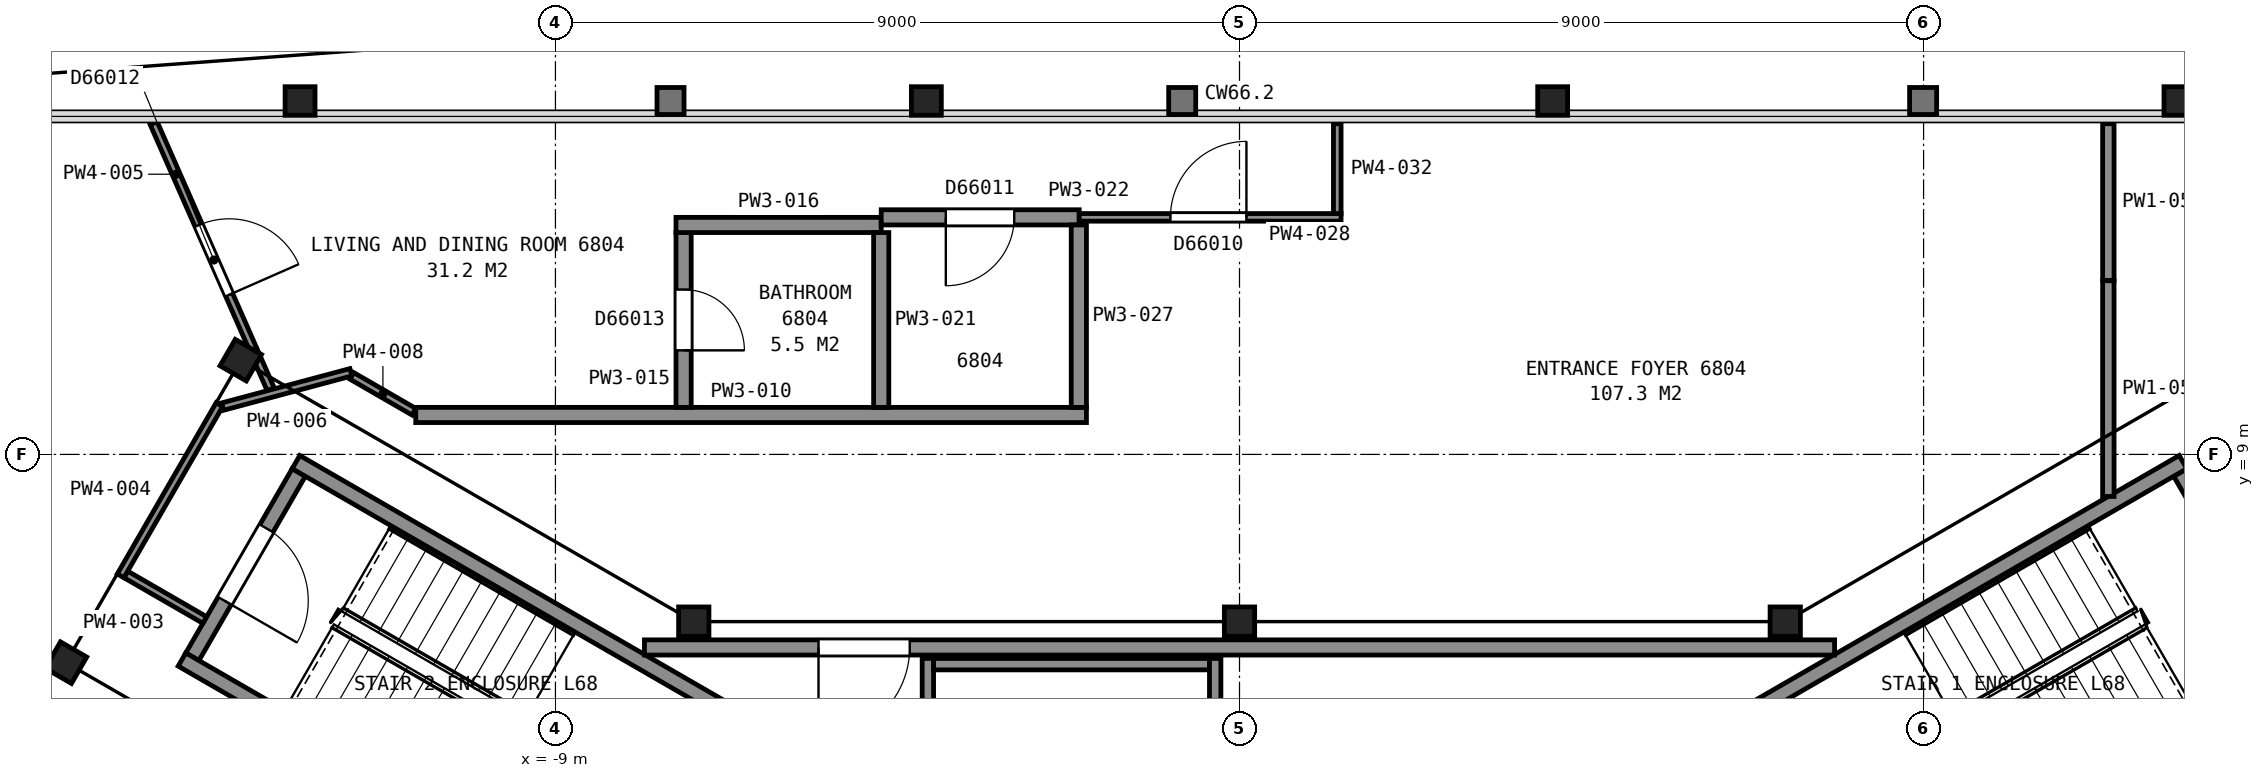
"""IFC4 building model, lengths in metres.
Left out: names, types, materials, properties, quantities, classifications, styles, units other than length and angle.
Written with IfcOpenShell. Run it as: python <this file> out.ifc"""

import sys

from ifc_helpers import new_model, si_unit, direction, frame, frame_2d, origin, origin_2d, place, context, subcontext, project, spatial, rectangle, i_section, extrude, element, fill, save


model = new_model("IFC4")
c1 = context("Model", 3, precision=1e-05, world=origin(), true_north=direction((0.0, 1.0)))
c2 = subcontext(c1, "Body", "Model", "MODEL_VIEW")
j1 = project(units=[si_unit("LENGTHUNIT", "METRE"), si_unit("PLANEANGLEUNIT", "RADIAN")], contexts=[c1])
p1 = place(None, origin())
s1 = spatial("IfcSite", under=j1, at=p1, CompositionType="ELEMENT")
p2 = place(p1, origin())
s2 = spatial("IfcBuilding", under=s1, at=p2, CompositionType="ELEMENT")
p3 = place(p2, frame((0.0, 0.0, 271.4)))
s3 = spatial("IfcBuildingStorey", under=s2, at=p3, CompositionType="ELEMENT", Elevation=271.4)
for number, where, z_axis, x_axis in (
    (1, (12.36, 13.65, 0.0), (0.0, 0.0, 1.0), (1.0, 0.0, 0.0)),
    (2, (4.12, 13.65, 0.0), (0.0, 0.0, 1.0), (1.0, 0.0, 0.0)),
    (3, (-4.12, 13.65, 0.0), (0.0, 0.0, 1.0), (1.0, 0.0, 0.0)),
    (4, (-12.36, 13.65, 0.0), (0.0, 0.0, 1.0), (1.0, 0.0, 0.0)),
):
    element("IfcColumn", number, at=place(p3, frame(where, z_axis=z_axis, x_axis=x_axis)), inside=s3, PredefinedType="COLUMN", context=c2, shape_type="SweptSolid", body=[
        extrude(i_section(OverallWidth=0.394, OverallDepth=0.376, WebThickness=0.017, FlangeThickness=0.028, FilletRadius=0.015, at=origin_2d()), origin(), (0.0, 0.0, 1.0), 3.7),
    ])
for number, where, z_axis, x_axis in (
    (5, (7.18, 6.8, 0.0), (0.0, 0.0, 1.0), (1.0, 0.0, 0.0)),
    (6, (0.0, 6.8, 0.0), (0.0, 0.0, 1.0), (1.0, 0.0, 0.0)),
    (7, (-7.18, 6.8, 0.0), (0.0, 0.0, 1.0), (1.0, 0.0, 0.0)),
):
    element("IfcColumn", number, at=place(p3, frame(where, z_axis=z_axis, x_axis=x_axis)), inside=s3, PredefinedType="COLUMN", context=c2, shape_type="SweptSolid", body=[
        extrude(i_section(OverallWidth=0.399, OverallDepth=0.386, WebThickness=0.021, FlangeThickness=0.033, FilletRadius=0.015, at=origin_2d()), origin(), (0.0, 0.0, 1.0), 3.7),
    ])
for number, where, z_axis, x_axis in (
    (8, (-13.14, 10.24, 0.0), (0.0, 0.0, 1.0), (0.5, 0.866, 0.0)),
    (9, (-15.44, 6.26, 0.0), (0.0, 0.0, 1.0), (0.5, 0.866, 0.0)),
):
    element("IfcColumn", number, at=place(p3, frame(where, z_axis=z_axis, x_axis=x_axis)), inside=s3, PredefinedType="COLUMN", context=c2, shape_type="SweptSolid", body=[
        extrude(i_section(OverallWidth=0.401, OverallDepth=0.399, WebThickness=0.025, FlangeThickness=0.04, FilletRadius=0.015, at=origin_2d()), origin(), (0.0, 0.0, 1.0), 3.7),
    ])
p4 = place(p3, frame((13.777, 6.338, 0.0), z_axis=(0.0, 0.0, 1.0), x_axis=(-0.500049511043, 0.865996816683, 0.0)))
e10 = element("IfcWall", 10, at=p4, inside=s3, PredefinedType="PARTITIONING", context=c2, shape_type="SweptSolid", body=[
    extrude(rectangle(XDim=2.8, YDim=0.2, at=frame_2d((1.4, 0.0))), origin(), (0.0, 0.0, 1.0), 3.45),
])
p5 = place(p4, frame((0.85, 0.0, 0.0)))
e11 = element("IfcOpeningElement", 11, at=p5, cuts=e10, PredefinedType="OPENING", context=c2, shape_type="SweptSolid", body=[
    extrude(rectangle(XDim=1.1, YDim=2.1, at=frame_2d((0.55, 1.05))), frame((0.0, 0.11, 0.0), z_axis=(0.0, -1.0, 0.0), x_axis=(1.0, 0.0, 0.0)), (0.0, 0.0, 1.0), 0.22),
])
for number, where, z_axis, x_axis in (
    (12, (6.178, 5.299, 0.0), (0.0, 0.0, 1.0), (0.866, 0.5, 0.0)),
    (13, (7.678, 2.701, 0.0), (0.0, 0.0, 1.0), (0.866, 0.5, 0.0)),
):
    element("IfcWall", number, at=place(p3, frame(where, z_axis=z_axis, x_axis=x_axis)), inside=s3, PredefinedType="PARTITIONING", context=c2, shape_type="SweptSolid", body=[
        extrude(rectangle(XDim=7.2, YDim=0.2, at=frame_2d((3.6, 0.0))), origin(), (0.0, 0.0, 1.0), 3.45),
    ])
p6 = place(p3, frame((-12.377, 8.762, 0.0), z_axis=(0.0, 0.0, 1.0), x_axis=(-0.500049511043, -0.865996816683, 0.0)))
e14 = element("IfcWall", 14, at=p6, inside=s3, PredefinedType="PARTITIONING", context=c2, shape_type="SweptSolid", body=[
    extrude(rectangle(XDim=2.8, YDim=0.2, at=frame_2d((1.4, 0.0))), origin(), (0.0, 0.0, 1.0), 3.45),
])
p7 = place(p6, frame((0.85, 0.0, 0.0)))
e15 = element("IfcOpeningElement", 15, at=p7, cuts=e14, PredefinedType="OPENING", context=c2, shape_type="SweptSolid", body=[
    extrude(rectangle(XDim=1.1, YDim=2.1, at=frame_2d((0.55, 1.05))), frame((0.0, 0.11, 0.0), z_axis=(0.0, -1.0, 0.0), x_axis=(1.0, 0.0, 0.0)), (0.0, 0.0, 1.0), 0.22),
])
for number, where, z_axis, x_axis in (
    (16, (-7.678, 2.701, 0.0), (0.0, 0.0, 1.0), (-0.866, 0.5, 0.0)),
    (17, (-6.178, 5.299, 0.0), (0.0, 0.0, 1.0), (-0.866, 0.5, 0.0)),
):
    element("IfcWall", number, at=place(p3, frame(where, z_axis=z_axis, x_axis=x_axis)), inside=s3, PredefinedType="PARTITIONING", context=c2, shape_type="SweptSolid", body=[
        extrude(rectangle(XDim=7.2, YDim=0.2, at=frame_2d((3.6, 0.0))), origin(), (0.0, 0.0, 1.0), 3.45),
    ])
p8 = place(p3, frame((7.829, 6.46, 0.0), z_axis=(0.0, 0.0, 1.0), x_axis=(-1.0, 0.0, 0.0)))
e18 = element("IfcWall", 18, at=p8, inside=s3, PredefinedType="PARTITIONING", context=c2, shape_type="SweptSolid", body=[
    extrude(rectangle(XDim=15.658, YDim=0.2, at=frame_2d((7.829, 0.0))), origin(), (0.0, 0.0, 1.0), 3.45),
])
p9 = place(p8, frame((12.168, 0.0, 0.0)))
e19 = element("IfcOpeningElement", 19, at=p9, cuts=e18, PredefinedType="OPENING", context=c2, shape_type="SweptSolid", body=[
    extrude(rectangle(XDim=1.2, YDim=2.1, at=frame_2d((0.6, 1.05))), frame((0.0, 0.11, 0.0), z_axis=(0.0, -1.0, 0.0), x_axis=(1.0, 0.0, 0.0)), (0.0, 0.0, 1.0), 0.22),
])
p10 = place(p3, frame((-4.1, 2.085, 0.0), z_axis=(0.0, 0.0, 1.0), x_axis=(0.0, 1.0, 0.0)))
e20 = element("IfcWall", 20, at=p10, inside=s3, PredefinedType="PARTITIONING", context=c2, shape_type="SweptSolid", body=[
    extrude(rectangle(XDim=4.23, YDim=0.15, at=frame_2d((2.115, 0.0))), origin(), (0.0, 0.0, 1.0), 3.45),
])
p11 = place(p10, frame((1.625, 0.0, 0.0)))
e21 = element("IfcOpeningElement", 21, at=p11, cuts=e20, PredefinedType="OPENING", context=c2, shape_type="SweptSolid", body=[
    extrude(rectangle(XDim=1.0, YDim=2.1, at=frame_2d((0.5, 1.05))), frame((0.0, 0.085, 0.0), z_axis=(0.0, -1.0, 0.0), x_axis=(1.0, 0.0, 0.0)), (0.0, 0.0, 1.0), 0.17),
])
p12 = place(p3, frame((-4.025, 6.24, 0.0), z_axis=(0.0, 0.0, 1.0), x_axis=(1.0, 0.0, 0.0)))
e22 = element("IfcWall", 22, at=p12, inside=s3, PredefinedType="PARTITIONING", context=c2, shape_type="SweptSolid", body=[
    extrude(rectangle(XDim=3.63, YDim=0.15, at=frame_2d((1.815, 0.0))), origin(), (0.0, 0.0, 1.0), 3.45),
])
p13 = place(p3, frame((-0.32, 2.252, 0.0), z_axis=(0.0, 0.0, 1.0), x_axis=(0.0, 1.0, 0.0)))
e23 = element("IfcWall", 23, at=p13, inside=s3, PredefinedType="PARTITIONING", context=c2, shape_type="SweptSolid", body=[
    extrude(rectangle(XDim=4.063, YDim=0.15, at=frame_2d((2.031, 0.0))), origin(), (0.0, 0.0, 1.0), 3.45),
])
p14 = place(p3, frame((-14.653, 7.421, 0.0), z_axis=(0.0, 0.0, 1.0), x_axis=(0.865941482684, -0.500145327446, 0.0)))
e24 = element("IfcWall", 24, at=p14, inside=s3, PredefinedType="PARTITIONING", context=c2, shape_type="SweptSolid", body=[
    extrude(rectangle(XDim=1.199, YDim=0.1, at=frame_2d((0.6, 0.0))), origin(), (0.0, 0.0, 1.0), 2.723),
])
p15 = place(p3, frame((-14.721, 7.403, 0.0), z_axis=(0.0, 0.0, 1.0), x_axis=(0.500006934395, 0.866021400173, 0.0)))
e25 = element("IfcWall", 25, at=p15, inside=s3, PredefinedType="PARTITIONING", context=c2, shape_type="SweptSolid", body=[
    extrude(rectangle(XDim=2.6, YDim=0.1, at=frame_2d((1.3, 0.0))), origin(), (0.0, 0.0, 1.0), 2.723),
])
p16 = place(p3, frame((-12.747, 9.857, 0.0), z_axis=(0.0, 0.0, 1.0), x_axis=(-0.402509649346, 0.91541574281, 0.0)))
e26 = element("IfcWall", 26, at=p16, inside=s3, PredefinedType="PARTITIONING", context=c2, shape_type="SweptSolid", body=[
    extrude(rectangle(XDim=3.824, YDim=0.1, at=frame_2d((1.912, 0.0))), origin(), (0.0, 0.0, 1.0), 2.723),
])
p17 = place(p16, frame((1.357, 0.0, 0.0)))
e27 = element("IfcOpeningElement", 27, at=p17, cuts=e26, PredefinedType="OPENING", context=c2, shape_type="SweptSolid", body=[
    extrude(rectangle(XDim=1.0, YDim=2.1, at=frame_2d((0.5, 1.05))), frame((0.0, 0.06, 0.0), z_axis=(0.0, -1.0, 0.0), x_axis=(1.0, 0.0, 0.0)), (0.0, 0.0, 1.0), 0.12),
])
p18 = place(p3, frame((-13.378, 9.629, 0.0), z_axis=(0.0, 0.0, 1.0), x_axis=(0.966007272337, 0.258514892785, 0.0)))
e28 = element("IfcWall", 28, at=p18, inside=s3, PredefinedType="PARTITIONING", context=c2, shape_type="SweptSolid", body=[
    extrude(rectangle(XDim=1.747, YDim=0.1, at=frame_2d((0.874, 0.0))), origin(), (0.0, 0.0, 1.0), 2.723),
])
p19 = place(p3, frame((-11.678, 10.033, 0.0), z_axis=(0.0, 0.0, 1.0), x_axis=(0.866116627388, -0.499841962787, 0.0)))
e29 = element("IfcWall", 29, at=p19, inside=s3, PredefinedType="PARTITIONING", context=c2, shape_type="SweptSolid", body=[
    extrude(rectangle(XDim=0.943, YDim=0.1, at=frame_2d((0.472, 0.0))), origin(), (0.0, 0.0, 1.0), 2.723),
])
p20 = place(p3, frame((-10.838, 9.519, 0.0), z_axis=(0.0, 0.0, 1.0), x_axis=(1.0, 0.0, 0.0)))
e30 = element("IfcWall", 30, at=p20, inside=s3, PredefinedType="PARTITIONING", context=c2, shape_type="SweptSolid", body=[
    extrude(rectangle(XDim=8.824, YDim=0.2, at=frame_2d((4.412, 0.0))), origin(), (0.0, 0.0, 1.0), 2.723),
])
p21 = place(p3, frame((-7.314, 11.919, 0.0), z_axis=(0.0, 0.0, 1.0), x_axis=(0.0, -1.0, 0.0)))
e31 = element("IfcWall", 31, at=p21, inside=s3, PredefinedType="PARTITIONING", context=c2, shape_type="SweptSolid", body=[
    extrude(rectangle(XDim=2.3, YDim=0.2, at=frame_2d((1.15, 0.0))), origin(), (0.0, 0.0, 1.0), 2.723),
])
p22 = place(p21, frame((0.75, 0.0, 0.0)))
e32 = element("IfcOpeningElement", 32, at=p22, cuts=e31, PredefinedType="OPENING", context=c2, shape_type="SweptSolid", body=[
    extrude(rectangle(XDim=0.8, YDim=2.1, at=frame_2d((0.4, 1.05))), frame((0.0, 0.11, 0.0), z_axis=(0.0, -1.0, 0.0), x_axis=(1.0, 0.0, 0.0)), (0.0, 0.0, 1.0), 0.22),
])
p23 = place(p3, frame((-7.414, 12.019, 0.0), z_axis=(0.0, 0.0, 1.0), x_axis=(1.0, 0.0, 0.0)))
e33 = element("IfcWall", 33, at=p23, inside=s3, PredefinedType="PARTITIONING", context=c2, shape_type="SweptSolid", body=[
    extrude(rectangle(XDim=2.7, YDim=0.2, at=frame_2d((1.35, 0.0))), origin(), (0.0, 0.0, 1.0), 2.723),
])
p24 = place(p3, frame((-4.714, 9.619, 0.0), z_axis=(0.0, 0.0, 1.0), x_axis=(0.0, 1.0, 0.0)))
e34 = element("IfcWall", 34, at=p24, inside=s3, PredefinedType="PARTITIONING", context=c2, shape_type="SweptSolid", body=[
    extrude(rectangle(XDim=2.3, YDim=0.2, at=frame_2d((1.15, 0.0))), origin(), (0.0, 0.0, 1.0), 2.723),
])
p25 = place(p3, frame((-2.109, 12.119, 0.0), z_axis=(0.0, 0.0, 1.0), x_axis=(-1.0, 0.0, 0.0)))
e35 = element("IfcWall", 35, at=p25, inside=s3, PredefinedType="PARTITIONING", context=c2, shape_type="SweptSolid", body=[
    extrude(rectangle(XDim=2.605, YDim=0.2, at=frame_2d((1.303, 0.0))), origin(), (0.0, 0.0, 1.0), 2.723),
])
p26 = place(p25, frame((0.855, 0.0, 0.0)))
e36 = element("IfcOpeningElement", 36, at=p26, cuts=e35, PredefinedType="OPENING", context=c2, shape_type="SweptSolid", body=[
    extrude(rectangle(XDim=0.9, YDim=2.1, at=frame_2d((0.45, 1.05))), frame((0.0, 0.11, 0.0), z_axis=(0.0, -1.0, 0.0), x_axis=(1.0, 0.0, 0.0)), (0.0, 0.0, 1.0), 0.22),
])
p27 = place(p3, frame((-2.114, 9.619, 0.0), z_axis=(0.0, 0.0, 1.0), x_axis=(0.0, 1.0, 0.0)))
e37 = element("IfcWall", 37, at=p27, inside=s3, PredefinedType="PARTITIONING", context=c2, shape_type="SweptSolid", body=[
    extrude(rectangle(XDim=2.4, YDim=0.2, at=frame_2d((1.2, 0.0))), origin(), (0.0, 0.0, 1.0), 2.723),
])
p28 = place(p3, frame((-2.109, 12.119, 0.0), z_axis=(0.0, 0.0, 1.0), x_axis=(1.0, 0.0, 0.0)))
e38 = element("IfcWall", 38, at=p28, inside=s3, PredefinedType="PARTITIONING", context=c2, shape_type="SweptSolid", body=[
    extrude(rectangle(XDim=3.445, YDim=0.1, at=frame_2d((1.722, 0.0))), origin(), (0.0, 0.0, 1.0), 2.723),
])
p29 = place(p28, frame((1.2, 0.0, 0.0)))
e39 = element("IfcOpeningElement", 39, at=p29, cuts=e38, PredefinedType="OPENING", context=c2, shape_type="SweptSolid", body=[
    extrude(rectangle(XDim=1.0, YDim=2.1, at=frame_2d((0.5, 1.05))), frame((0.0, 0.06, 0.0), z_axis=(0.0, -1.0, 0.0), x_axis=(1.0, 0.0, 0.0)), (0.0, 0.0, 1.0), 0.12),
])
p30 = place(p3, frame((1.286, 12.169, 0.0), z_axis=(0.0, 0.0, 1.0), x_axis=(0.0, 1.0, 0.0)))
e40 = element("IfcWall", 40, at=p30, inside=s3, PredefinedType="PARTITIONING", context=c2, shape_type="SweptSolid", body=[
    extrude(rectangle(XDim=1.182, YDim=0.1, at=frame_2d((0.591, 0.0))), origin(), (0.0, 0.0, 1.0), 2.723),
])
p31 = place(p3, frame((11.431, 8.447, 0.0), z_axis=(0.0, 0.0, 1.0), x_axis=(0.0, 1.0, 0.0)))
e41 = element("IfcWall", 41, at=p31, inside=s3, PredefinedType="PARTITIONING", context=c2, shape_type="SweptSolid", body=[
    extrude(rectangle(XDim=2.838, YDim=0.15, at=frame_2d((1.419, 0.0))), origin(), (0.0, 0.0, 1.0), 2.723),
])
p32 = place(p3, frame((11.431, 11.29, 0.0), z_axis=(0.0, 0.0, 1.0), x_axis=(0.0, 1.0, 0.0)))
e42 = element("IfcWall", 42, at=p32, inside=s3, PredefinedType="PARTITIONING", context=c2, shape_type="SweptSolid", body=[
    extrude(rectangle(XDim=2.061, YDim=0.15, at=frame_2d((1.031, 0.0))), origin(), (0.0, 0.0, 1.0), 2.723),
])
p33 = place(p7, origin())
e43 = element("IfcDoor", 43, at=p33, inside=s3, OperationType="SINGLE_SWING_RIGHT", PredefinedType="DOOR", context=c2, shape_type="SweptSolid", body=[
    extrude(rectangle(XDim=1.1, YDim=2.1, at=frame_2d((0.55, 1.05))), frame((0.0, 0.025, 0.0), z_axis=(0.0, -1.0, 0.0), x_axis=(1.0, 0.0, 0.0)), (0.0, 0.0, 1.0), 0.05),
])
fill(e15, e43)
p34 = place(p9, origin())
e44 = element("IfcDoor", 44, at=p34, inside=s3, OperationType="SINGLE_SWING_RIGHT", PredefinedType="DOOR", context=c2, shape_type="SweptSolid", body=[
    extrude(rectangle(XDim=1.2, YDim=2.1, at=frame_2d((0.6, 1.05))), frame((0.0, 0.025, 0.0), z_axis=(0.0, -1.0, 0.0), x_axis=(1.0, 0.0, 0.0)), (0.0, 0.0, 1.0), 0.05),
])
fill(e19, e44)
p35 = place(p17, origin())
e45 = element("IfcDoor", 45, at=p35, inside=s3, OperationType="SINGLE_SWING_LEFT", PredefinedType="DOOR", context=c2, shape_type="SweptSolid", body=[
    extrude(rectangle(XDim=1.0, YDim=2.1, at=frame_2d((0.5, 1.05))), frame((0.0, 0.025, 0.0), z_axis=(0.0, -1.0, 0.0), x_axis=(1.0, 0.0, 0.0)), (0.0, 0.0, 1.0), 0.05),
])
fill(e27, e45)
p36 = place(p22, origin())
e46 = element("IfcDoor", 46, at=p36, inside=s3, OperationType="SINGLE_SWING_RIGHT", PredefinedType="DOOR", context=c2, shape_type="SweptSolid", body=[
    extrude(rectangle(XDim=0.8, YDim=2.1, at=frame_2d((0.4, 1.05))), frame((0.0, 0.025, 0.0), z_axis=(0.0, -1.0, 0.0), x_axis=(1.0, 0.0, 0.0)), (0.0, 0.0, 1.0), 0.05),
])
fill(e32, e46)
p37 = place(p26, origin())
e47 = element("IfcDoor", 47, at=p37, inside=s3, OperationType="SINGLE_SWING_RIGHT", PredefinedType="DOOR", context=c2, shape_type="SweptSolid", body=[
    extrude(rectangle(XDim=0.9, YDim=2.1, at=frame_2d((0.45, 1.05))), frame((0.0, 0.025, 0.0), z_axis=(0.0, -1.0, 0.0), x_axis=(1.0, 0.0, 0.0)), (0.0, 0.0, 1.0), 0.05),
])
fill(e36, e47)
p38 = place(p29, origin())
e48 = element("IfcDoor", 48, at=p38, inside=s3, OperationType="SINGLE_SWING_RIGHT", PredefinedType="DOOR", context=c2, shape_type="SweptSolid", body=[
    extrude(rectangle(XDim=1.0, YDim=2.1, at=frame_2d((0.5, 1.05))), frame((0.0, 0.025, 0.0), z_axis=(0.0, -1.0, 0.0), x_axis=(1.0, 0.0, 0.0)), (0.0, 0.0, 1.0), 0.05),
])
fill(e39, e48)
save(model, sys.argv[1])
